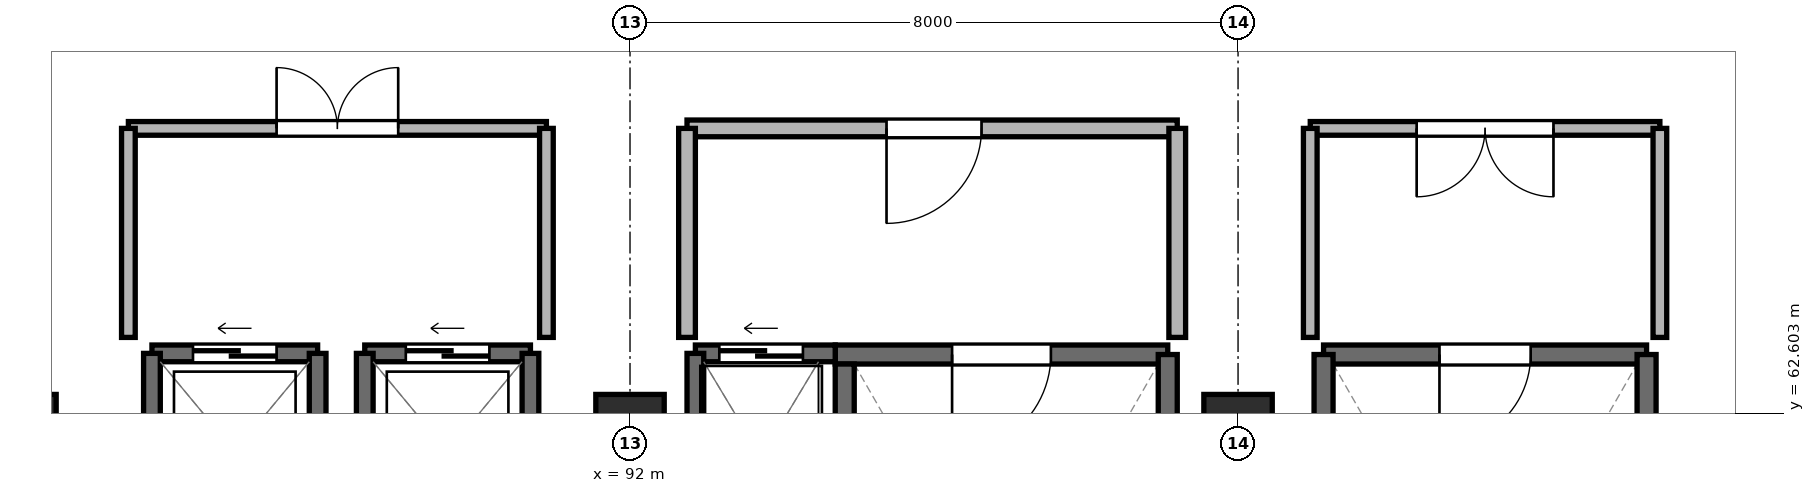
"""IFC4 building model, lengths in metres.
Left out: names, types, materials, properties, quantities, classifications, styles, units other than length and angle.
Written with IfcOpenShell. Run it as: python <this file> out.ifc"""

import sys

from ifc_helpers import new_model, si_unit, direction, frame, frame_2d, origin, origin_2d, place, context, subcontext, project, spatial, rectangle, extrude, element, fill, save


model = new_model("IFC4")
c1 = context("Model", 3, precision=1e-05, world=origin(), true_north=direction((0.0, 1.0)))
c2 = subcontext(c1, "Body", "Model", "MODEL_VIEW")
j1 = project(units=[si_unit("LENGTHUNIT", "METRE"), si_unit("PLANEANGLEUNIT", "RADIAN")], contexts=[c1])
p1 = place(None, origin())
s1 = spatial("IfcSite", under=j1, at=p1, CompositionType="ELEMENT")
p2 = place(p1, origin())
s2 = spatial("IfcBuilding", under=s1, at=p2, CompositionType="ELEMENT")
p3 = place(p2, frame((0.0, 0.0, 34.05)))
s3 = spatial("IfcBuildingStorey", under=s2, at=p3, CompositionType="ELEMENT", Elevation=34.05)
for number, where, z_axis, x_axis in (
    (1, (84.0, 62.4, -0.25), (0.0, 0.0, 1.0), (1.0, 0.0, 0.0)),
    (2, (92.0, 62.4, -0.25), (0.0, 0.0, 1.0), (1.0, 0.0, 0.0)),
    (3, (100.0, 62.4, -0.25), (0.0, 0.0, 1.0), (1.0, 0.0, 0.0)),
):
    element("IfcColumn", number, at=place(p3, frame(where, z_axis=z_axis, x_axis=x_axis)), inside=s3, PredefinedType="COLUMN", context=c2, shape_type="SweptSolid", body=[
        extrude(rectangle(XDim=0.9, YDim=0.9, at=origin_2d()), origin(), (0.0, 0.0, 1.0), 3.25),
    ])
p4 = place(p3, frame((99.075, 63.375, 0.0), z_axis=(0.0, 0.0, 1.0), x_axis=(-1.0, 0.0, 0.0)))
e4 = element("IfcWall", 4, at=p4, inside=s3, PredefinedType="SHEAR", context=c2, shape_type="SweptSolid", body=[
    extrude(rectangle(XDim=4.375, YDim=0.25, at=frame_2d((2.188, 0.0))), origin(), (0.0, 0.0, 1.0), 3.0),
])
p5 = place(p4, frame((1.538, 0.0, 0.0)))
e5 = element("IfcOpeningElement", 5, at=p5, cuts=e4, PredefinedType="OPENING", context=c2, shape_type="SweptSolid", body=[
    extrude(rectangle(XDim=1.3, YDim=2.2, at=frame_2d((0.65, 1.1))), frame((0.0, 0.137, 0.0), z_axis=(0.0, -1.0, 0.0), x_axis=(1.0, 0.0, 0.0)), (0.0, 0.0, 1.0), 0.274),
])
p6 = place(p3, frame((94.825, 63.25, 0.0), z_axis=(0.0, 0.0, 1.0), x_axis=(0.0, -1.0, 0.0)))
e6 = element("IfcWall", 6, at=p6, inside=s3, PredefinedType="SHEAR", context=c2, shape_type="SweptSolid", body=[
    extrude(rectangle(XDim=7.075, YDim=0.25, at=frame_2d((3.538, 0.0))), origin(), (0.0, 0.0, 1.0), 3.0),
])
p7 = place(p3, frame((99.075, 56.175, 0.0), z_axis=(0.0, 0.0, 1.0), x_axis=(0.0, 1.0, 0.0)))
e7 = element("IfcWall", 7, at=p7, inside=s3, PredefinedType="SHEAR", context=c2, shape_type="SweptSolid", body=[
    extrude(rectangle(XDim=7.2, YDim=0.25, at=frame_2d((3.6, 0.0))), origin(), (0.0, 0.0, 1.0), 3.0),
])
p8 = place(p3, frame((105.375, 63.375, 0.0), z_axis=(0.0, 0.0, 1.0), x_axis=(-1.0, 0.0, 0.0)))
e8 = element("IfcWall", 8, at=p8, inside=s3, PredefinedType="SHEAR", context=c2, shape_type="SweptSolid", body=[
    extrude(rectangle(XDim=4.25, YDim=0.25, at=frame_2d((2.125, 0.0))), origin(), (0.0, 0.0, 1.0), 3.0),
])
p9 = place(p8, frame((1.525, 0.0, 0.0)))
e9 = element("IfcOpeningElement", 9, at=p9, cuts=e8, PredefinedType="OPENING", context=c2, shape_type="SweptSolid", body=[
    extrude(rectangle(XDim=1.2, YDim=2.2, at=frame_2d((0.6, 1.1))), frame((0.0, 0.137, 0.0), z_axis=(0.0, -1.0, 0.0), x_axis=(1.0, 0.0, 0.0)), (0.0, 0.0, 1.0), 0.274),
])
for number, where, z_axis, x_axis in (
    (10, (101.125, 63.375, 0.0), (0.0, 0.0, 1.0), (0.0, -1.0, 0.0)),
    (11, (105.375, 56.175, 0.0), (0.0, 0.0, 1.0), (0.0, 1.0, 0.0)),
):
    element("IfcWall", number, at=place(p3, frame(where, z_axis=z_axis, x_axis=x_axis)), inside=s3, PredefinedType="SHEAR", context=c2, shape_type="SweptSolid", body=[
        extrude(rectangle(XDim=7.2, YDim=0.25, at=frame_2d((3.6, 0.0))), origin(), (0.0, 0.0, 1.0), 3.0),
    ])
p10 = place(p3, frame((94.7, 63.39, 0.0), z_axis=(0.0, 0.0, 1.0), x_axis=(-1.0, 0.0, 0.0)))
e12 = element("IfcWall", 12, at=p10, inside=s3, PredefinedType="SHEAR", context=c2, shape_type="SweptSolid", body=[
    extrude(rectangle(XDim=1.84, YDim=0.22, at=frame_2d((0.92, 0.0))), origin(), (0.0, 0.0, 1.0), 3.0),
])
p11 = place(p10, frame((0.425, 0.0, 0.0)))
e13 = element("IfcOpeningElement", 13, at=p11, cuts=e12, PredefinedType="OPENING", context=c2, shape_type="SweptSolid", body=[
    extrude(rectangle(XDim=1.1, YDim=2.2, at=frame_2d((0.55, 1.1))), frame((0.0, 0.122, 0.0), z_axis=(0.0, -1.0, 0.0), x_axis=(1.0, 0.0, 0.0)), (0.0, 0.0, 1.0), 0.244),
])
p12 = place(p3, frame((92.86, 63.39, 0.0), z_axis=(0.0, 0.0, 1.0), x_axis=(0.0, -1.0, 0.0)))
e14 = element("IfcWall", 14, at=p12, inside=s3, PredefinedType="SHEAR", context=c2, shape_type="SweptSolid", body=[
    extrude(rectangle(XDim=2.73, YDim=0.22, at=frame_2d((1.365, 0.0))), origin(), (0.0, 0.0, 1.0), 3.0),
])
p13 = place(p3, frame((87.89, 63.39, 0.0), z_axis=(0.0, 0.0, 1.0), x_axis=(-1.0, 0.0, 0.0)))
e15 = element("IfcWall", 15, at=p13, inside=s3, PredefinedType="SHEAR", context=c2, shape_type="SweptSolid", body=[
    extrude(rectangle(XDim=2.18, YDim=0.22, at=frame_2d((1.09, 0.0))), origin(), (0.0, 0.0, 1.0), 3.0),
])
p14 = place(p13, frame((0.54, 0.0, 0.0)))
e16 = element("IfcOpeningElement", 16, at=p14, cuts=e15, PredefinedType="OPENING", context=c2, shape_type="SweptSolid", body=[
    extrude(rectangle(XDim=1.1, YDim=2.2, at=frame_2d((0.55, 1.1))), frame((0.0, 0.122, 0.0), z_axis=(0.0, -1.0, 0.0), x_axis=(1.0, 0.0, 0.0)), (0.0, 0.0, 1.0), 0.244),
])
for number, where, z_axis, x_axis in (
    (17, (85.71, 63.39, 0.0), (0.0, 0.0, 1.0), (0.0, -1.0, 0.0)),
    (18, (87.89, 60.81, 0.0), (0.0, 0.0, 1.0), (0.0, 1.0, 0.0)),
):
    element("IfcWall", number, at=place(p3, frame(where, z_axis=z_axis, x_axis=x_axis)), inside=s3, PredefinedType="SHEAR", context=c2, shape_type="SweptSolid", body=[
        extrude(rectangle(XDim=2.58, YDim=0.22, at=frame_2d((1.29, 0.0))), origin(), (0.0, 0.0, 1.0), 3.0),
    ])
p15 = place(p3, frame((90.69, 63.39, 0.0), z_axis=(0.0, 0.0, 1.0), x_axis=(-1.0, 0.0, 0.0)))
e19 = element("IfcWall", 19, at=p15, inside=s3, PredefinedType="SHEAR", context=c2, shape_type="SweptSolid", body=[
    extrude(rectangle(XDim=2.18, YDim=0.22, at=frame_2d((1.09, 0.0))), origin(), (0.0, 0.0, 1.0), 3.0),
])
p16 = place(p15, frame((0.54, 0.0, 0.0)))
e20 = element("IfcOpeningElement", 20, at=p16, cuts=e19, PredefinedType="OPENING", context=c2, shape_type="SweptSolid", body=[
    extrude(rectangle(XDim=1.1, YDim=2.2, at=frame_2d((0.55, 1.1))), frame((0.0, 0.122, 0.0), z_axis=(0.0, -1.0, 0.0), x_axis=(1.0, 0.0, 0.0)), (0.0, 0.0, 1.0), 0.244),
])
for number, where, z_axis, x_axis in (
    (21, (88.51, 63.39, 0.0), (0.0, 0.0, 1.0), (0.0, -1.0, 0.0)),
    (22, (90.69, 60.81, 0.0), (0.0, 0.0, 1.0), (0.0, 1.0, 0.0)),
):
    element("IfcWall", number, at=place(p3, frame(where, z_axis=z_axis, x_axis=x_axis)), inside=s3, PredefinedType="SHEAR", context=c2, shape_type="SweptSolid", body=[
        extrude(rectangle(XDim=2.58, YDim=0.22, at=frame_2d((1.29, 0.0))), origin(), (0.0, 0.0, 1.0), 3.0),
    ])
p17 = place(p3, frame((92.75, 66.35, 0.0), z_axis=(0.0, 0.0, 1.0), x_axis=(1.0, 0.0, 0.0)))
e23 = element("IfcWall", 23, at=p17, inside=s3, PredefinedType="PARTITIONING", context=c2, shape_type="SweptSolid", body=[
    extrude(rectangle(XDim=6.45, YDim=0.22, at=frame_2d((3.225, 0.0))), origin(), (0.0, 0.0, 1.0), 2.53),
])
p18 = place(p17, frame((2.625, 0.0, 0.0)))
e24 = element("IfcOpeningElement", 24, at=p18, cuts=e23, PredefinedType="OPENING", context=c2, shape_type="SweptSolid", body=[
    extrude(rectangle(XDim=1.25, YDim=2.2, at=frame_2d((0.625, 1.1))), frame((0.0, 0.122, 0.0), z_axis=(0.0, -1.0, 0.0), x_axis=(1.0, 0.0, 0.0)), (0.0, 0.0, 1.0), 0.244),
])
for number, where, z_axis, x_axis in (
    (25, (92.75, 63.6, 0.0), (0.0, 0.0, 1.0), (0.0, 1.0, 0.0)),
    (26, (99.2, 63.6, 0.0), (0.0, 0.0, 1.0), (0.0, 1.0, 0.0)),
):
    element("IfcWall", number, at=place(p3, frame(where, z_axis=z_axis, x_axis=x_axis)), inside=s3, PredefinedType="PARTITIONING", context=c2, shape_type="SweptSolid", body=[
        extrude(rectangle(XDim=2.75, YDim=0.22, at=frame_2d((1.375, 0.0))), origin(), (0.0, 0.0, 1.0), 2.53),
    ])
p19 = place(p3, frame((85.4, 66.35, 0.0), z_axis=(0.0, 0.0, 1.0), x_axis=(1.0, 0.0, 0.0)))
e27 = element("IfcWall", 27, at=p19, inside=s3, PredefinedType="PARTITIONING", context=c2, shape_type="SweptSolid", body=[
    extrude(rectangle(XDim=5.5, YDim=0.18, at=frame_2d((2.75, 0.0))), origin(), (0.0, 0.0, 1.0), 2.53),
])
p20 = place(p19, frame((1.95, 0.0, 0.0)))
e28 = element("IfcOpeningElement", 28, at=p20, cuts=e27, PredefinedType="OPENING", context=c2, shape_type="SweptSolid", body=[
    extrude(rectangle(XDim=1.6, YDim=2.2, at=frame_2d((0.8, 1.1))), frame((0.0, 0.102, 0.0), z_axis=(0.0, -1.0, 0.0), x_axis=(1.0, 0.0, 0.0)), (0.0, 0.0, 1.0), 0.204),
])
for number, where, z_axis, x_axis in (
    (29, (85.4, 63.6, 0.0), (0.0, 0.0, 1.0), (0.0, 1.0, 0.0)),
    (30, (90.9, 63.6, 0.0), (0.0, 0.0, 1.0), (0.0, 1.0, 0.0)),
):
    element("IfcWall", number, at=place(p3, frame(where, z_axis=z_axis, x_axis=x_axis)), inside=s3, PredefinedType="PARTITIONING", context=c2, shape_type="SweptSolid", body=[
        extrude(rectangle(XDim=2.75, YDim=0.18, at=frame_2d((1.375, 0.0))), origin(), (0.0, 0.0, 1.0), 2.53),
    ])
p21 = place(p3, frame((100.95, 66.35, 0.0), z_axis=(0.0, 0.0, 1.0), x_axis=(1.0, 0.0, 0.0)))
e31 = element("IfcWall", 31, at=p21, inside=s3, PredefinedType="PARTITIONING", context=c2, shape_type="SweptSolid", body=[
    extrude(rectangle(XDim=4.6, YDim=0.18, at=frame_2d((2.3, 0.0))), origin(), (0.0, 0.0, 1.0), 2.53),
])
p22 = place(p21, frame((1.4, 0.0, 0.0)))
e32 = element("IfcOpeningElement", 32, at=p22, cuts=e31, PredefinedType="OPENING", context=c2, shape_type="SweptSolid", body=[
    extrude(rectangle(XDim=1.8, YDim=2.2, at=frame_2d((0.9, 1.1))), frame((0.0, 0.102, 0.0), z_axis=(0.0, -1.0, 0.0), x_axis=(1.0, 0.0, 0.0)), (0.0, 0.0, 1.0), 0.204),
])
for number, where, z_axis, x_axis in (
    (33, (100.95, 63.6, 0.0), (0.0, 0.0, 1.0), (0.0, 1.0, 0.0)),
    (34, (105.55, 63.6, 0.0), (0.0, 0.0, 1.0), (0.0, 1.0, 0.0)),
):
    element("IfcWall", number, at=place(p3, frame(where, z_axis=z_axis, x_axis=x_axis)), inside=s3, PredefinedType="PARTITIONING", context=c2, shape_type="SweptSolid", body=[
        extrude(rectangle(XDim=2.75, YDim=0.18, at=frame_2d((1.375, 0.0))), origin(), (0.0, 0.0, 1.0), 2.53),
    ])
p23 = place(p5, origin())
e35 = element("IfcDoor", 35, at=p23, inside=s3, OperationType="SINGLE_SWING_RIGHT", PredefinedType="DOOR", context=c2, shape_type="SweptSolid", body=[
    extrude(rectangle(XDim=1.3, YDim=2.2, at=frame_2d((0.65, 1.1))), frame((0.0, 0.025, 0.0), z_axis=(0.0, -1.0, 0.0), x_axis=(1.0, 0.0, 0.0)), (0.0, 0.0, 1.0), 0.05),
])
fill(e5, e35)
p24 = place(p9, origin())
e36 = element("IfcDoor", 36, at=p24, inside=s3, OperationType="SINGLE_SWING_RIGHT", PredefinedType="DOOR", context=c2, shape_type="SweptSolid", body=[
    extrude(rectangle(XDim=1.2, YDim=2.2, at=frame_2d((0.6, 1.1))), frame((0.0, 0.025, 0.0), z_axis=(0.0, -1.0, 0.0), x_axis=(1.0, 0.0, 0.0)), (0.0, 0.0, 1.0), 0.05),
])
fill(e9, e36)
p25 = place(p11, origin())
e37 = element("IfcDoor", 37, at=p25, inside=s3, OperationType="SLIDING_TO_RIGHT", PredefinedType="DOOR", context=c2, shape_type="SweptSolid", body=[
    extrude(rectangle(XDim=1.1, YDim=2.2, at=frame_2d((0.55, 1.1))), frame((0.0, 0.025, 0.0), z_axis=(0.0, -1.0, 0.0), x_axis=(1.0, 0.0, 0.0)), (0.0, 0.0, 1.0), 0.05),
])
fill(e13, e37)
p26 = place(p14, origin())
e38 = element("IfcDoor", 38, at=p26, inside=s3, OperationType="SLIDING_TO_RIGHT", PredefinedType="DOOR", context=c2, shape_type="SweptSolid", body=[
    extrude(rectangle(XDim=1.1, YDim=2.2, at=frame_2d((0.55, 1.1))), frame((0.0, 0.025, 0.0), z_axis=(0.0, -1.0, 0.0), x_axis=(1.0, 0.0, 0.0)), (0.0, 0.0, 1.0), 0.05),
])
fill(e16, e38)
p27 = place(p16, origin())
e39 = element("IfcDoor", 39, at=p27, inside=s3, OperationType="SLIDING_TO_RIGHT", PredefinedType="DOOR", context=c2, shape_type="SweptSolid", body=[
    extrude(rectangle(XDim=1.1, YDim=2.2, at=frame_2d((0.55, 1.1))), frame((0.0, 0.025, 0.0), z_axis=(0.0, -1.0, 0.0), x_axis=(1.0, 0.0, 0.0)), (0.0, 0.0, 1.0), 0.05),
])
fill(e20, e39)
p28 = place(p18, frame((1.25, 0.0, 0.0), z_axis=(0.0, 0.0, 1.0), x_axis=(-1.0, 0.0, 0.0)))
e40 = element("IfcDoor", 40, at=p28, inside=s3, OperationType="SINGLE_SWING_LEFT", PredefinedType="DOOR", context=c2, shape_type="SweptSolid", body=[
    extrude(rectangle(XDim=1.25, YDim=2.2, at=frame_2d((0.625, 1.1))), frame((0.0, 0.025, 0.0), z_axis=(0.0, -1.0, 0.0), x_axis=(1.0, 0.0, 0.0)), (0.0, 0.0, 1.0), 0.05),
])
fill(e24, e40)
p29 = place(p20, origin())
e41 = element("IfcDoor", 41, at=p29, inside=s3, OperationType="DOUBLE_DOOR_SINGLE_SWING", PredefinedType="DOOR", context=c2, shape_type="SweptSolid", body=[
    extrude(rectangle(XDim=1.6, YDim=2.2, at=frame_2d((0.8, 1.1))), frame((0.0, 0.025, 0.0), z_axis=(0.0, -1.0, 0.0), x_axis=(1.0, 0.0, 0.0)), (0.0, 0.0, 1.0), 0.05),
])
fill(e28, e41)
p30 = place(p22, frame((1.8, 0.0, 0.0), z_axis=(0.0, 0.0, 1.0), x_axis=(-1.0, 0.0, 0.0)))
e42 = element("IfcDoor", 42, at=p30, inside=s3, OperationType="DOUBLE_DOOR_SINGLE_SWING", PredefinedType="DOOR", context=c2, shape_type="SweptSolid", body=[
    extrude(rectangle(XDim=1.8, YDim=2.2, at=frame_2d((0.9, 1.1))), frame((0.0, 0.025, 0.0), z_axis=(0.0, -1.0, 0.0), x_axis=(1.0, 0.0, 0.0)), (0.0, 0.0, 1.0), 0.05),
])
fill(e32, e42)
save(model, sys.argv[1])
